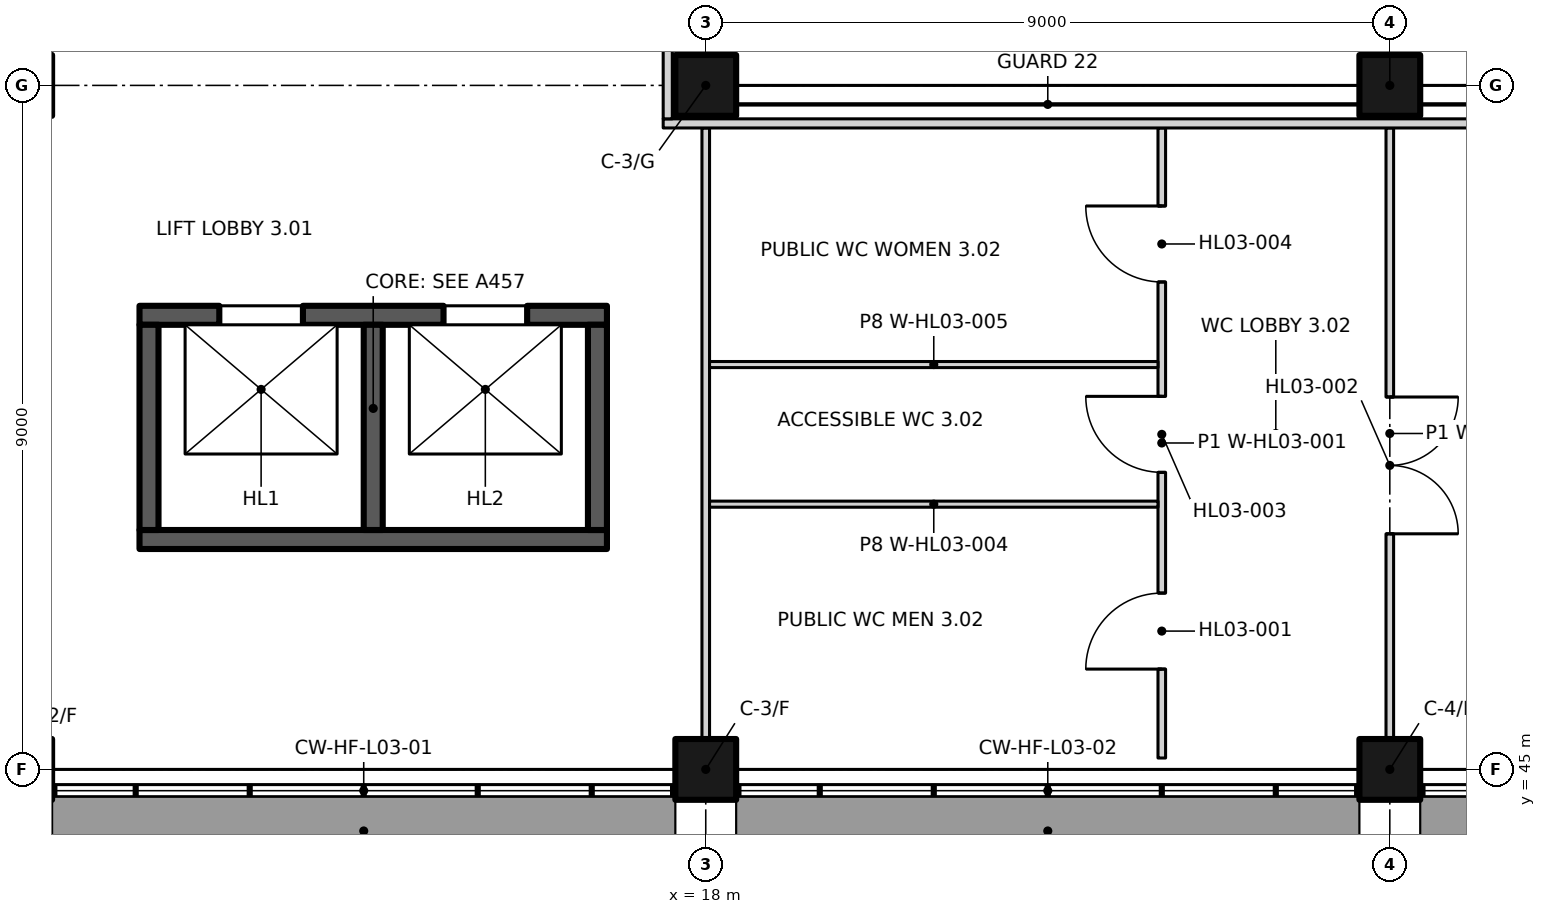
"""IFC4 building model, lengths in metres.
Left out: names, types, materials, properties, quantities, classifications, styles, units other than length and angle.
Written with IfcOpenShell. Run it as: python <this file> out.ifc"""

import sys

from ifc_helpers import new_model, si_unit, direction, frame, frame_2d, origin, origin_2d, place, context, subcontext, project, spatial, rectangle, extrude, element, fill, save


model = new_model("IFC4")
c1 = context("Model", 3, precision=1e-05, world=origin(), true_north=direction((0.0, 1.0)))
c2 = subcontext(c1, "Body", "Model", "MODEL_VIEW")
j1 = project(units=[si_unit("LENGTHUNIT", "METRE"), si_unit("PLANEANGLEUNIT", "RADIAN")], contexts=[c1])
p1 = place(None, origin())
s1 = spatial("IfcSite", under=j1, at=p1, CompositionType="ELEMENT")
p2 = place(p1, origin())
s2 = spatial("IfcBuilding", under=s1, at=p2, CompositionType="ELEMENT")
p3 = place(p2, frame((0.0, 0.0, 15.0)))
s3 = spatial("IfcBuildingStorey", under=s2, at=p3, CompositionType="ELEMENT", Elevation=15.0)
for number, where, z_axis, x_axis in (
    (1, (9.0, 45.0, 0.0), (0.0, 0.0, 1.0), (1.0, 0.0, 0.0)),
    (2, (18.0, 45.0, 0.0), (0.0, 0.0, 1.0), (1.0, 0.0, 0.0)),
    (3, (27.0, 45.0, 0.0), (0.0, 0.0, 1.0), (1.0, 0.0, 0.0)),
    (4, (9.0, 54.0, 0.0), (0.0, 0.0, 1.0), (1.0, 0.0, 0.0)),
    (5, (18.0, 54.0, 0.0), (0.0, 0.0, 1.0), (1.0, 0.0, 0.0)),
    (6, (27.0, 54.0, 0.0), (0.0, 0.0, 1.0), (1.0, 0.0, 0.0)),
):
    element("IfcColumn", number, at=place(p3, frame(where, z_axis=z_axis, x_axis=x_axis)), inside=s3, PredefinedType="COLUMN", context=c2, shape_type="SweptSolid", body=[
        extrude(rectangle(XDim=0.8, YDim=0.8, at=origin_2d()), origin(), (0.0, 0.0, 1.0), 4.5),
    ])
p4 = place(p3, frame((10.55, 50.975, 0.0), z_axis=(0.0, 0.0, 1.0), x_axis=(1.0, 0.0, 0.0)))
e7 = element("IfcWall", 7, at=p4, inside=s3, PredefinedType="SHEAR", context=c2, shape_type="SweptSolid", body=[
    extrude(rectangle(XDim=6.15, YDim=0.25, at=frame_2d((3.075, 0.0))), origin(), (0.0, 0.0, 1.0), 4.5),
])
p5 = place(p4, frame((1.05, 0.0, 0.0)))
e8 = element("IfcOpeningElement", 8, at=p5, cuts=e7, PredefinedType="OPENING", context=c2, shape_type="SweptSolid", body=[
    extrude(rectangle(XDim=1.1, YDim=2.1, at=frame_2d((0.55, 1.05))), frame((0.0, 0.135, 0.0), z_axis=(0.0, -1.0, 0.0), x_axis=(1.0, 0.0, 0.0)), (0.0, 0.0, 1.0), 0.27),
])
p6 = place(p4, frame((4.0, 0.0, 0.0)))
e9 = element("IfcOpeningElement", 9, at=p6, cuts=e7, PredefinedType="OPENING", context=c2, shape_type="SweptSolid", body=[
    extrude(rectangle(XDim=1.1, YDim=2.1, at=frame_2d((0.55, 1.05))), frame((0.0, 0.135, 0.0), z_axis=(0.0, -1.0, 0.0), x_axis=(1.0, 0.0, 0.0)), (0.0, 0.0, 1.0), 0.27),
])
p7 = place(p3, frame((10.55, 48.025, 0.0), z_axis=(0.0, 0.0, 1.0), x_axis=(1.0, 0.0, 0.0)))
e10 = element("IfcWall", 10, at=p7, inside=s3, PredefinedType="SHEAR", context=c2, shape_type="SweptSolid", body=[
    extrude(rectangle(XDim=6.15, YDim=0.25, at=frame_2d((3.075, 0.0))), origin(), (0.0, 0.0, 1.0), 4.5),
])
for number, where, z_axis, x_axis in (
    (11, (10.675, 48.15, 0.0), (0.0, 0.0, 1.0), (0.0, 1.0, 0.0)),
    (12, (13.625, 48.15, 0.0), (0.0, 0.0, 1.0), (0.0, 1.0, 0.0)),
    (13, (16.575, 48.15, 0.0), (0.0, 0.0, 1.0), (0.0, 1.0, 0.0)),
):
    element("IfcWall", number, at=place(p3, frame(where, z_axis=z_axis, x_axis=x_axis)), inside=s3, PredefinedType="SHEAR", context=c2, shape_type="SweptSolid", body=[
        extrude(rectangle(XDim=2.7, YDim=0.25, at=frame_2d((1.35, 0.0))), origin(), (0.0, 0.0, 1.0), 4.5),
    ])
p8 = place(p3, frame((24.0, 45.15, 0.0), z_axis=(0.0, 0.0, 1.0), x_axis=(0.0, 1.0, 0.0)))
e14 = element("IfcWall", 14, at=p8, inside=s3, PredefinedType="PARTITIONING", context=c2, shape_type="SweptSolid", body=[
    extrude(rectangle(XDim=8.29, YDim=0.1, at=frame_2d((4.145, 0.0))), origin(), (0.0, 0.0, 1.0), 3.7),
])
p9 = place(p8, frame((1.17, 0.0, 0.0)))
e15 = element("IfcOpeningElement", 15, at=p9, cuts=e14, PredefinedType="OPENING", context=c2, shape_type="SweptSolid", body=[
    extrude(rectangle(XDim=1.0, YDim=2.1, at=frame_2d((0.5, 1.05))), frame((0.0, 0.06, 0.0), z_axis=(0.0, -1.0, 0.0), x_axis=(1.0, 0.0, 0.0)), (0.0, 0.0, 1.0), 0.12),
])
p10 = place(p8, frame((3.759, 0.0, 0.0)))
e16 = element("IfcOpeningElement", 16, at=p10, cuts=e14, PredefinedType="OPENING", context=c2, shape_type="SweptSolid", body=[
    extrude(rectangle(XDim=1.0, YDim=2.1, at=frame_2d((0.5, 1.05))), frame((0.0, 0.06, 0.0), z_axis=(0.0, -1.0, 0.0), x_axis=(1.0, 0.0, 0.0)), (0.0, 0.0, 1.0), 0.12),
])
p11 = place(p8, frame((6.263, 0.0, 0.0)))
e17 = element("IfcOpeningElement", 17, at=p11, cuts=e14, PredefinedType="OPENING", context=c2, shape_type="SweptSolid", body=[
    extrude(rectangle(XDim=1.0, YDim=2.1, at=frame_2d((0.5, 1.05))), frame((0.0, 0.06, 0.0), z_axis=(0.0, -1.0, 0.0), x_axis=(1.0, 0.0, 0.0)), (0.0, 0.0, 1.0), 0.12),
])
p12 = place(p3, frame((18.0, 45.4, 0.0), z_axis=(0.0, 0.0, 1.0), x_axis=(0.0, 1.0, 0.0)))
e18 = element("IfcWall", 18, at=p12, inside=s3, PredefinedType="PARTITIONING", context=c2, shape_type="SweptSolid", body=[
    extrude(rectangle(XDim=8.04, YDim=0.1, at=frame_2d((4.02, 0.0))), origin(), (0.0, 0.0, 1.0), 3.7),
])
p13 = place(p3, frame((27.0, 45.4, 0.0), z_axis=(0.0, 0.0, 1.0), x_axis=(0.0, 1.0, 0.0)))
e19 = element("IfcWall", 19, at=p13, inside=s3, PredefinedType="PARTITIONING", context=c2, shape_type="SweptSolid", body=[
    extrude(rectangle(XDim=8.04, YDim=0.1, at=frame_2d((4.02, 0.0))), origin(), (0.0, 0.0, 1.0), 4.2),
])
p14 = place(p13, frame((4.5, 0.0, 0.0), z_axis=(0.0, 0.0, 1.0), x_axis=(-1.0, 0.0, 0.0)))
e20 = element("IfcOpeningElement", 20, at=p14, cuts=e19, PredefinedType="OPENING", context=c2, shape_type="SweptSolid", body=[
    extrude(rectangle(XDim=1.8, YDim=2.1, at=frame_2d((0.9, 1.05))), frame((0.0, 0.06, 0.0), z_axis=(0.0, -1.0, 0.0), x_axis=(1.0, 0.0, 0.0)), (0.0, 0.0, 1.0), 0.12),
])
for number, where, z_axis, x_axis in (
    (21, (18.05, 48.49, 0.0), (0.0, 0.0, 1.0), (1.0, 0.0, 0.0)),
    (22, (18.05, 50.327, 0.0), (0.0, 0.0, 1.0), (1.0, 0.0, 0.0)),
):
    element("IfcWall", number, at=place(p3, frame(where, z_axis=z_axis, x_axis=x_axis)), inside=s3, PredefinedType="PARTITIONING", context=c2, shape_type="SweptSolid", body=[
        extrude(rectangle(XDim=5.9, YDim=0.08, at=frame_2d((2.95, 0.0))), origin(), (0.0, 0.0, 1.0), 3.7),
    ])
p15 = place(p3, frame((17.44, 53.5, 0.0), z_axis=(0.0, 0.0, 1.0), x_axis=(1.0, 0.0, 0.0)))
e23 = element("IfcWall", 23, at=p15, inside=s3, PredefinedType="PARTITIONING", context=c2, shape_type="SweptSolid", body=[
    extrude(rectangle(XDim=28.12, YDim=0.12, at=frame_2d((14.06, 0.0))), origin(), (0.0, 0.0, 1.0), 3.7),
])
p16 = place(p3, frame((17.5, 53.56, 0.0), z_axis=(0.0, 0.0, 1.0), x_axis=(0.0, 1.0, 0.0)))
e24 = element("IfcWall", 24, at=p16, inside=s3, PredefinedType="PARTITIONING", context=c2, shape_type="SweptSolid", body=[
    extrude(rectangle(XDim=36.565, YDim=0.12, at=frame_2d((18.282, 0.0))), origin(), (0.0, 0.0, 1.0), 3.7),
])
p17 = place(p5, origin())
e25 = element("IfcDoor", 25, at=p17, inside=s3, OperationType="DOUBLE_DOOR_SLIDING", PredefinedType="DOOR", context=c2, shape_type="SweptSolid", body=[
    extrude(rectangle(XDim=1.1, YDim=2.1, at=frame_2d((0.55, 1.05))), frame((0.0, 0.025, 0.0), z_axis=(0.0, -1.0, 0.0), x_axis=(1.0, 0.0, 0.0)), (0.0, 0.0, 1.0), 0.05),
])
fill(e8, e25)
p18 = place(p6, origin())
e26 = element("IfcDoor", 26, at=p18, inside=s3, OperationType="DOUBLE_DOOR_SLIDING", PredefinedType="DOOR", context=c2, shape_type="SweptSolid", body=[
    extrude(rectangle(XDim=1.1, YDim=2.1, at=frame_2d((0.55, 1.05))), frame((0.0, 0.025, 0.0), z_axis=(0.0, -1.0, 0.0), x_axis=(1.0, 0.0, 0.0)), (0.0, 0.0, 1.0), 0.05),
])
fill(e9, e26)
p19 = place(p9, origin())
e27 = element("IfcDoor", 27, at=p19, inside=s3, OperationType="SINGLE_SWING_LEFT", PredefinedType="DOOR", context=c2, shape_type="SweptSolid", body=[
    extrude(rectangle(XDim=1.0, YDim=2.1, at=frame_2d((0.5, 1.05))), frame((0.0, 0.025, 0.0), z_axis=(0.0, -1.0, 0.0), x_axis=(1.0, 0.0, 0.0)), (0.0, 0.0, 1.0), 0.05),
])
fill(e15, e27)
p20 = place(p14, origin())
e28 = element("IfcDoor", 28, at=p20, inside=s3, OperationType="DOUBLE_DOOR_SINGLE_SWING", PredefinedType="DOOR", context=c2, shape_type="SweptSolid", body=[
    extrude(rectangle(XDim=1.8, YDim=2.1, at=frame_2d((0.9, 1.05))), frame((0.0, 0.025, 0.0), z_axis=(0.0, -1.0, 0.0), x_axis=(1.0, 0.0, 0.0)), (0.0, 0.0, 1.0), 0.05),
])
fill(e20, e28)
p21 = place(p10, origin())
e29 = element("IfcDoor", 29, at=p21, inside=s3, OperationType="SINGLE_SWING_RIGHT", PredefinedType="DOOR", context=c2, shape_type="SweptSolid", body=[
    extrude(rectangle(XDim=1.0, YDim=2.1, at=frame_2d((0.5, 1.05))), frame((0.0, 0.025, 0.0), z_axis=(0.0, -1.0, 0.0), x_axis=(1.0, 0.0, 0.0)), (0.0, 0.0, 1.0), 0.05),
])
fill(e16, e29)
p22 = place(p11, origin())
e30 = element("IfcDoor", 30, at=p22, inside=s3, OperationType="SINGLE_SWING_RIGHT", PredefinedType="DOOR", context=c2, shape_type="SweptSolid", body=[
    extrude(rectangle(XDim=1.0, YDim=2.1, at=frame_2d((0.5, 1.05))), frame((0.0, 0.025, 0.0), z_axis=(0.0, -1.0, 0.0), x_axis=(1.0, 0.0, 0.0)), (0.0, 0.0, 1.0), 0.05),
])
fill(e17, e30)
save(model, sys.argv[1])
